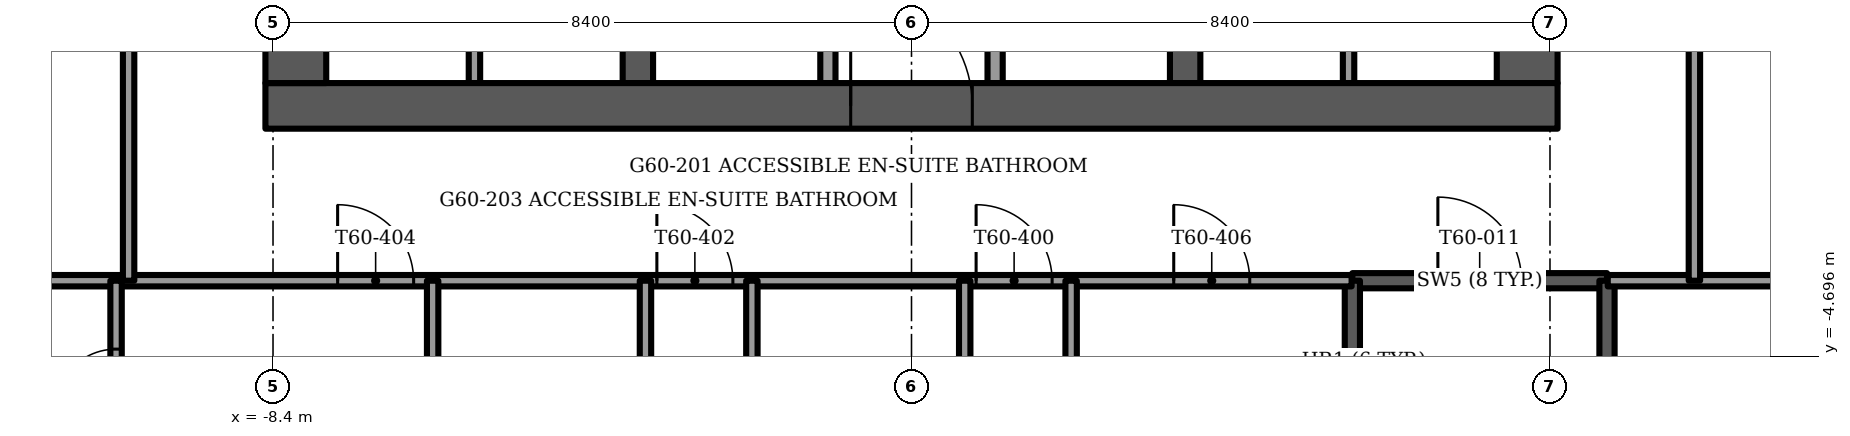
"""IFC4 building model, lengths in metres.
Left out: names, types, materials, properties, quantities, classifications, styles, units other than length and angle.
Written with IfcOpenShell. Run it as: python <this file> out.ifc"""

import sys

from ifc_helpers import new_model, si_unit, direction, frame, frame_2d, origin, place, context, subcontext, project, spatial, rectangle, extrude, element, fill, save


model = new_model("IFC4")
c1 = context("Model", 3, precision=1e-05, world=origin(), true_north=direction((0.0, 1.0)))
c2 = subcontext(c1, "Body", "Model", "MODEL_VIEW")
j1 = project(units=[si_unit("LENGTHUNIT", "METRE"), si_unit("PLANEANGLEUNIT", "RADIAN")], contexts=[c1])
p1 = place(None, origin())
s1 = spatial("IfcSite", under=j1, at=p1, CompositionType="ELEMENT")
p2 = place(p1, origin())
s2 = spatial("IfcBuilding", under=s1, at=p2, CompositionType="ELEMENT")
p3 = place(p2, frame((0.0, 0.0, 245.0)))
s3 = spatial("IfcBuildingStorey", under=s2, at=p3, CompositionType="ELEMENT", Elevation=245.0)
p4 = place(p3, frame((-8.5, -1.4, -0.3), z_axis=(0.0, 0.0, 1.0), x_axis=(1.0, 0.0, 0.0)))
e1 = element("IfcWall", 1, at=p4, inside=s3, PredefinedType="SHEAR", context=c2, shape_type="SweptSolid", body=[
    extrude(rectangle(XDim=17.0, YDim=0.6, at=frame_2d((8.5, 0.0))), origin(), (0.0, 0.0, 1.0), 3.75),
])
p5 = place(p4, frame((7.7, 0.0, 0.0)))
e2 = element("IfcOpeningElement", 2, at=p5, cuts=e1, PredefinedType="OPENING", context=c2, shape_type="SweptSolid", body=[
    extrude(rectangle(XDim=1.6, YDim=2.1, at=frame_2d((0.8, 1.05))), frame((0.0, 0.3, 0.0), z_axis=(0.0, -1.0, 0.0), x_axis=(1.0, 0.0, 0.0)), (0.0, 0.0, 1.0), 0.6),
])
p6 = place(p3, frame((-8.1, -1.1, -0.3), z_axis=(0.0, 0.0, 1.0), x_axis=(0.0, 1.0, 0.0)))
e3 = element("IfcWall", 3, at=p6, inside=s3, PredefinedType="SHEAR", context=c2, shape_type="SweptSolid", body=[
    extrude(rectangle(XDim=10.2, YDim=0.8, at=frame_2d((5.1, 0.0))), origin(), (0.0, 0.0, 1.0), 3.75),
])
p7 = place(p6, frame((8.35, 0.0, 0.0)))
e4 = element("IfcOpeningElement", 4, at=p7, cuts=e3, PredefinedType="OPENING", context=c2, shape_type="SweptSolid", body=[
    extrude(rectangle(XDim=1.1, YDim=2.1, at=frame_2d((0.55, 1.05))), frame((0.0, 0.4, 0.0), z_axis=(0.0, -1.0, 0.0), x_axis=(1.0, 0.0, 0.0)), (0.0, 0.0, 1.0), 0.8),
])
p8 = place(p3, frame((8.1, -1.1, -0.3), z_axis=(0.0, 0.0, 1.0), x_axis=(0.0, 1.0, 0.0)))
e5 = element("IfcWall", 5, at=p8, inside=s3, PredefinedType="SHEAR", context=c2, shape_type="SweptSolid", body=[
    extrude(rectangle(XDim=10.2, YDim=0.8, at=frame_2d((5.1, 0.0))), origin(), (0.0, 0.0, 1.0), 3.75),
])
p9 = place(p8, frame((8.35, 0.0, 0.0)))
e6 = element("IfcOpeningElement", 6, at=p9, cuts=e5, PredefinedType="OPENING", context=c2, shape_type="SweptSolid", body=[
    extrude(rectangle(XDim=1.1, YDim=2.1, at=frame_2d((0.55, 1.05))), frame((0.0, 0.4, 0.0), z_axis=(0.0, -1.0, 0.0), x_axis=(1.0, 0.0, 0.0)), (0.0, 0.0, 1.0), 0.8),
])
for number, where, z_axis, x_axis in (
    (7, (-3.6, -1.1, -0.3), (0.0, 0.0, 1.0), (0.0, 1.0, 0.0)),
    (8, (3.6, -1.1, -0.3), (0.0, 0.0, 1.0), (0.0, 1.0, 0.0)),
):
    element("IfcWall", number, at=place(p3, frame(where, z_axis=z_axis, x_axis=x_axis)), inside=s3, PredefinedType="SHEAR", context=c2, shape_type="SweptSolid", body=[
        extrude(rectangle(XDim=10.2, YDim=0.4, at=frame_2d((5.1, 0.0))), origin(), (0.0, 0.0, 1.0), 3.75),
    ])
p10 = place(p3, frame((-15.387, -1.198, 0.0), z_axis=(0.0, 0.0, 1.0), x_axis=(0.499997087355, -0.866027085394, 0.0)))
e9 = element("IfcWall", 9, at=p10, inside=s3, PredefinedType="SOLIDWALL", context=c2, shape_type="SweptSolid", body=[
    extrude(rectangle(XDim=13.312, YDim=0.15, at=frame_2d((6.656, 0.0))), origin(), (0.0, 0.0, 1.0), 3.45),
])
p11 = place(p10, frame((4.115, 0.0, 0.15)))
e10 = element("IfcOpeningElement", 10, at=p11, cuts=e9, PredefinedType="OPENING", context=c2, shape_type="SweptSolid", body=[
    extrude(rectangle(XDim=1.4, YDim=2.85, at=frame_2d((0.7, 1.425))), frame((0.0, 0.075, 0.0), z_axis=(0.0, -1.0, 0.0), x_axis=(1.0, 0.0, 0.0)), (0.0, 0.0, 1.0), 0.15),
])
p12 = place(p10, frame((6.956, 0.0, 0.15)))
e11 = element("IfcOpeningElement", 11, at=p12, cuts=e9, PredefinedType="OPENING", context=c2, shape_type="SweptSolid", body=[
    extrude(rectangle(XDim=1.5, YDim=2.85, at=frame_2d((0.75, 1.425))), frame((0.0, 0.075, 0.0), z_axis=(0.0, -1.0, 0.0), x_axis=(1.0, 0.0, 0.0)), (0.0, 0.0, 1.0), 0.15),
])
p13 = place(p10, frame((9.156, 0.0, 0.0)))
e12 = element("IfcOpeningElement", 12, at=p13, cuts=e9, PredefinedType="OPENING", context=c2, shape_type="SweptSolid", body=[
    extrude(rectangle(XDim=1.4, YDim=2.4, at=frame_2d((0.7, 1.2))), frame((0.0, 0.075, 0.0), z_axis=(0.0, -1.0, 0.0), x_axis=(1.0, 0.0, 0.0)), (0.0, 0.0, 1.0), 0.15),
])
p14 = place(p10, frame((0.428, 0.0, 0.15)))
e13 = element("IfcOpeningElement", 13, at=p14, cuts=e9, PredefinedType="OPENING", context=c2, shape_type="SweptSolid", body=[
    extrude(rectangle(XDim=1.5, YDim=2.73, at=frame_2d((0.75, 1.365))), frame((0.0, 0.075, 0.0), z_axis=(0.0, -1.0, 0.0), x_axis=(1.0, 0.0, 0.0)), (0.0, 0.0, 1.0), 0.15),
])
p15 = place(p3, frame((8.731, -12.727, 0.0), z_axis=(0.0, 0.0, 1.0), x_axis=(0.499997087355, 0.866027085394, 0.0)))
e14 = element("IfcWall", 14, at=p15, inside=s3, PredefinedType="SOLIDWALL", context=c2, shape_type="SweptSolid", body=[
    extrude(rectangle(XDim=13.312, YDim=0.15, at=frame_2d((6.656, 0.0))), origin(), (0.0, 0.0, 1.0), 3.45),
])
p16 = place(p15, frame((2.756, 0.0, 0.15)))
e15 = element("IfcOpeningElement", 15, at=p16, cuts=e14, PredefinedType="OPENING", context=c2, shape_type="SweptSolid", body=[
    extrude(rectangle(XDim=1.5, YDim=2.85, at=frame_2d((0.75, 1.425))), frame((0.0, 0.075, 0.0), z_axis=(0.0, -1.0, 0.0), x_axis=(1.0, 0.0, 0.0)), (0.0, 0.0, 1.0), 0.15),
])
p17 = place(p15, frame((4.956, 0.0, 0.0)))
e16 = element("IfcOpeningElement", 16, at=p17, cuts=e14, PredefinedType="OPENING", context=c2, shape_type="SweptSolid", body=[
    extrude(rectangle(XDim=1.4, YDim=2.4, at=frame_2d((0.7, 1.2))), frame((0.0, 0.075, 0.0), z_axis=(0.0, -1.0, 0.0), x_axis=(1.0, 0.0, 0.0)), (0.0, 0.0, 1.0), 0.15),
])
p18 = place(p15, frame((6.956, 0.0, 0.15)))
e17 = element("IfcOpeningElement", 17, at=p18, cuts=e14, PredefinedType="OPENING", context=c2, shape_type="SweptSolid", body=[
    extrude(rectangle(XDim=0.9, YDim=2.85, at=frame_2d((0.45, 1.425))), frame((0.0, 0.075, 0.0), z_axis=(0.0, -1.0, 0.0), x_axis=(1.0, 0.0, 0.0)), (0.0, 0.0, 1.0), 0.15),
])
p19 = place(p15, frame((8.149, 0.0, 0.0)))
e18 = element("IfcOpeningElement", 18, at=p19, cuts=e14, PredefinedType="OPENING", context=c2, shape_type="SweptSolid", body=[
    extrude(rectangle(XDim=1.4, YDim=2.4, at=frame_2d((0.7, 1.2))), frame((0.0, 0.075, 0.0), z_axis=(0.0, -1.0, 0.0), x_axis=(1.0, 0.0, 0.0)), (0.0, 0.0, 1.0), 0.15),
])
p20 = place(p15, frame((11.385, 0.0, 0.15)))
e19 = element("IfcOpeningElement", 19, at=p20, cuts=e14, PredefinedType="OPENING", context=c2, shape_type="SweptSolid", body=[
    extrude(rectangle(XDim=1.5, YDim=2.73, at=frame_2d((0.75, 1.365))), frame((0.0, 0.075, 0.0), z_axis=(0.0, -1.0, 0.0), x_axis=(1.0, 0.0, 0.0)), (0.0, 0.0, 1.0), 0.15),
])
for number, where, z_axis, x_axis in (
    (20, (-1.1, -1.1, 0.0), (0.0, 0.0, 1.0), (0.0, 1.0, 0.0)),
    (21, (1.1, -1.1, 0.0), (0.0, 0.0, 1.0), (0.0, 1.0, 0.0)),
):
    element("IfcWall", number, at=place(p3, frame(where, z_axis=z_axis, x_axis=x_axis)), inside=s3, PredefinedType="PARTITIONING", context=c2, shape_type="SweptSolid", body=[
        extrude(rectangle(XDim=2.9, YDim=0.2, at=frame_2d((1.45, 0.0))), origin(), (0.0, 0.0, 1.0), 3.45),
    ])
for number, where, z_axis, x_axis in (
    (22, (-5.75, -1.1, 0.0), (0.0, 0.0, 1.0), (0.0, 1.0, 0.0)),
    (23, (5.75, -1.1, 0.0), (0.0, 0.0, 1.0), (0.0, 1.0, 0.0)),
):
    element("IfcWall", number, at=place(p3, frame(where, z_axis=z_axis, x_axis=x_axis)), inside=s3, PredefinedType="PARTITIONING", context=c2, shape_type="SweptSolid", body=[
        extrude(rectangle(XDim=2.0, YDim=0.15, at=frame_2d((1.0, 0.0))), origin(), (0.0, 0.0, 1.0), 3.45),
    ])
p21 = place(p3, frame((5.8, -3.7, -0.3), z_axis=(0.0, 0.0, 1.0), x_axis=(1.0, 0.0, 0.0)))
e24 = element("IfcWall", 24, at=p21, inside=s3, PredefinedType="SOLIDWALL", context=c2, shape_type="SweptSolid", body=[
    extrude(rectangle(XDim=3.35, YDim=0.2, at=frame_2d((1.675, 0.0))), origin(), (0.0, 0.0, 1.0), 3.75),
])
p22 = place(p21, frame((1.125, 0.0, 0.0)))
e25 = element("IfcOpeningElement", 25, at=p22, cuts=e24, PredefinedType="OPENING", context=c2, shape_type="SweptSolid", body=[
    extrude(rectangle(XDim=1.1, YDim=2.1, at=frame_2d((0.55, 1.05))), frame((0.0, 0.1, 0.0), z_axis=(0.0, -1.0, 0.0), x_axis=(1.0, 0.0, 0.0)), (0.0, 0.0, 1.0), 0.2),
])
for number, where, z_axis, x_axis in (
    (26, (5.8, -3.7, -0.3), (0.0, 0.0, 1.0), (0.0, -1.0, 0.0)),
    (27, (9.15, -3.7, -0.3), (0.0, 0.0, 1.0), (0.0, -1.0, 0.0)),
):
    element("IfcWall", number, at=place(p3, frame(where, z_axis=z_axis, x_axis=x_axis)), inside=s3, PredefinedType="SOLIDWALL", context=c2, shape_type="SweptSolid", body=[
        extrude(rectangle(XDim=7.7, YDim=0.2, at=frame_2d((3.85, 0.0))), origin(), (0.0, 0.0, 1.0), 3.75),
    ])
p23 = place(p3, frame((-13.995, -3.7, 0.0), z_axis=(0.0, 0.0, 1.0), x_axis=(1.0, 0.0, 0.0)))
e28 = element("IfcWall", 28, at=p23, inside=s3, PredefinedType="PARTITIONING", context=c2, shape_type="SweptSolid", body=[
    extrude(rectangle(XDim=19.785, YDim=0.15, at=frame_2d((9.893, 0.0))), origin(), (0.0, 0.0, 1.0), 3.45),
])
p24 = place(p23, frame((14.845, 0.0, 0.0)))
e29 = element("IfcOpeningElement", 29, at=p24, cuts=e28, PredefinedType="OPENING", context=c2, shape_type="SweptSolid", body=[
    extrude(rectangle(XDim=1.0, YDim=2.1, at=frame_2d((0.5, 1.05))), frame((0.0, 0.075, 0.0), z_axis=(0.0, -1.0, 0.0), x_axis=(1.0, 0.0, 0.0)), (0.0, 0.0, 1.0), 0.15),
])
p25 = place(p23, frame((10.645, 0.0, 0.0)))
e30 = element("IfcOpeningElement", 30, at=p25, cuts=e28, PredefinedType="OPENING", context=c2, shape_type="SweptSolid", body=[
    extrude(rectangle(XDim=1.0, YDim=2.1, at=frame_2d((0.5, 1.05))), frame((0.0, 0.075, 0.0), z_axis=(0.0, -1.0, 0.0), x_axis=(1.0, 0.0, 0.0)), (0.0, 0.0, 1.0), 0.15),
])
p26 = place(p23, frame((6.445, 0.0, 0.0)))
e31 = element("IfcOpeningElement", 31, at=p26, cuts=e28, PredefinedType="OPENING", context=c2, shape_type="SweptSolid", body=[
    extrude(rectangle(XDim=1.0, YDim=2.1, at=frame_2d((0.5, 1.05))), frame((0.0, 0.075, 0.0), z_axis=(0.0, -1.0, 0.0), x_axis=(1.0, 0.0, 0.0)), (0.0, 0.0, 1.0), 0.15),
])
p27 = place(p23, frame((17.445, 0.0, 0.0)))
e32 = element("IfcOpeningElement", 32, at=p27, cuts=e28, PredefinedType="OPENING", context=c2, shape_type="SweptSolid", body=[
    extrude(rectangle(XDim=1.0, YDim=2.1, at=frame_2d((0.5, 1.05))), frame((0.0, 0.075, 0.0), z_axis=(0.0, -1.0, 0.0), x_axis=(1.0, 0.0, 0.0)), (0.0, 0.0, 1.0), 0.15),
])
p28 = place(p3, frame((9.16, -3.7, 0.0), z_axis=(0.0, 0.0, 1.0), x_axis=(1.0, 0.0, 0.0)))
e33 = element("IfcWall", 33, at=p28, inside=s3, PredefinedType="PARTITIONING", context=c2, shape_type="SweptSolid", body=[
    extrude(rectangle(XDim=4.835, YDim=0.15, at=frame_2d((2.417, 0.0))), origin(), (0.0, 0.0, 1.0), 3.45),
])
p29 = place(p3, frame((10.3, -3.7, 0.0), z_axis=(0.0, 0.0, 1.0), x_axis=(0.0, 1.0, 0.0)))
e34 = element("IfcWall", 34, at=p29, inside=s3, PredefinedType="PARTITIONING", context=c2, shape_type="SweptSolid", body=[
    extrude(rectangle(XDim=12.469, YDim=0.15, at=frame_2d((6.234, 0.0))), origin(), (0.0, 0.0, 1.0), 3.45),
])
p30 = place(p29, frame((4.471, 0.0, 0.0)))
e35 = element("IfcOpeningElement", 35, at=p30, cuts=e34, PredefinedType="OPENING", context=c2, shape_type="SweptSolid", body=[
    extrude(rectangle(XDim=1.0, YDim=2.1, at=frame_2d((0.5, 1.05))), frame((0.0, 0.075, 0.0), z_axis=(0.0, -1.0, 0.0), x_axis=(1.0, 0.0, 0.0)), (0.0, 0.0, 1.0), 0.15),
])
p31 = place(p29, frame((9.815, 0.0, 0.0)))
e36 = element("IfcOpeningElement", 36, at=p31, cuts=e34, PredefinedType="OPENING", context=c2, shape_type="SweptSolid", body=[
    extrude(rectangle(XDim=1.0, YDim=2.1, at=frame_2d((0.5, 1.05))), frame((0.0, 0.075, 0.0), z_axis=(0.0, -1.0, 0.0), x_axis=(1.0, 0.0, 0.0)), (0.0, 0.0, 1.0), 0.15),
])
p32 = place(p3, frame((2.1, -13.304, 0.0), z_axis=(0.0, 0.0, 1.0), x_axis=(0.0, 1.0, 0.0)))
e37 = element("IfcWall", 37, at=p32, inside=s3, PredefinedType="PARTITIONING", context=c2, shape_type="SweptSolid", body=[
    extrude(rectangle(XDim=9.604, YDim=0.15, at=frame_2d((4.802, 0.0))), origin(), (0.0, 0.0, 1.0), 3.45),
])
p33 = place(p3, frame((0.7, -7.5, 0.0), z_axis=(0.0, 0.0, 1.0), x_axis=(0.0, 1.0, 0.0)))
e38 = element("IfcWall", 38, at=p33, inside=s3, PredefinedType="PARTITIONING", context=c2, shape_type="SweptSolid", body=[
    extrude(rectangle(XDim=3.8, YDim=0.15, at=frame_2d((1.9, 0.0))), origin(), (0.0, 0.0, 1.0), 3.45),
])
p34 = place(p33, frame((1.45, 0.0, 0.0)))
e39 = element("IfcOpeningElement", 39, at=p34, cuts=e38, PredefinedType="OPENING", context=c2, shape_type="SweptSolid", body=[
    extrude(rectangle(XDim=0.9, YDim=2.1, at=frame_2d((0.45, 1.05))), frame((0.0, 0.075, 0.0), z_axis=(0.0, -1.0, 0.0), x_axis=(1.0, 0.0, 0.0)), (0.0, 0.0, 1.0), 0.15),
])
p35 = place(p3, frame((-2.1, -13.304, 0.0), z_axis=(0.0, 0.0, 1.0), x_axis=(0.0, 1.0, 0.0)))
e40 = element("IfcWall", 40, at=p35, inside=s3, PredefinedType="PARTITIONING", context=c2, shape_type="SweptSolid", body=[
    extrude(rectangle(XDim=9.604, YDim=0.15, at=frame_2d((4.802, 0.0))), origin(), (0.0, 0.0, 1.0), 3.45),
])
p36 = place(p3, frame((-3.5, -7.5, 0.0), z_axis=(0.0, 0.0, 1.0), x_axis=(0.0, 1.0, 0.0)))
e41 = element("IfcWall", 41, at=p36, inside=s3, PredefinedType="PARTITIONING", context=c2, shape_type="SweptSolid", body=[
    extrude(rectangle(XDim=3.8, YDim=0.15, at=frame_2d((1.9, 0.0))), origin(), (0.0, 0.0, 1.0), 3.45),
])
p37 = place(p36, frame((1.45, 0.0, 0.0)))
e42 = element("IfcOpeningElement", 42, at=p37, cuts=e41, PredefinedType="OPENING", context=c2, shape_type="SweptSolid", body=[
    extrude(rectangle(XDim=0.9, YDim=2.1, at=frame_2d((0.45, 1.05))), frame((0.0, 0.075, 0.0), z_axis=(0.0, -1.0, 0.0), x_axis=(1.0, 0.0, 0.0)), (0.0, 0.0, 1.0), 0.15),
])
p38 = place(p3, frame((-6.3, -13.304, 0.0), z_axis=(0.0, 0.0, 1.0), x_axis=(0.0, 1.0, 0.0)))
e43 = element("IfcWall", 43, at=p38, inside=s3, PredefinedType="PARTITIONING", context=c2, shape_type="SweptSolid", body=[
    extrude(rectangle(XDim=9.604, YDim=0.15, at=frame_2d((4.802, 0.0))), origin(), (0.0, 0.0, 1.0), 3.45),
])
p39 = place(p3, frame((-10.3, -3.7, 0.0), z_axis=(0.0, 0.0, 1.0), x_axis=(0.0, 1.0, 0.0)))
e44 = element("IfcWall", 44, at=p39, inside=s3, PredefinedType="PARTITIONING", context=c2, shape_type="SweptSolid", body=[
    extrude(rectangle(XDim=12.469, YDim=0.15, at=frame_2d((6.234, 0.0))), origin(), (0.0, 0.0, 1.0), 3.45),
])
p40 = place(p39, frame((4.332, 0.0, 0.0)))
e45 = element("IfcOpeningElement", 45, at=p40, cuts=e44, PredefinedType="OPENING", context=c2, shape_type="SweptSolid", body=[
    extrude(rectangle(XDim=1.0, YDim=2.1, at=frame_2d((0.5, 1.05))), frame((0.0, 0.075, 0.0), z_axis=(0.0, -1.0, 0.0), x_axis=(1.0, 0.0, 0.0)), (0.0, 0.0, 1.0), 0.15),
])
p41 = place(p39, frame((9.815, 0.0, 0.0)))
e46 = element("IfcOpeningElement", 46, at=p41, cuts=e44, PredefinedType="OPENING", context=c2, shape_type="SweptSolid", body=[
    extrude(rectangle(XDim=1.0, YDim=2.1, at=frame_2d((0.5, 1.05))), frame((0.0, 0.075, 0.0), z_axis=(0.0, -1.0, 0.0), x_axis=(1.0, 0.0, 0.0)), (0.0, 0.0, 1.0), 0.15),
])
p42 = place(p3, frame((-10.465, -6.3, 0.0), z_axis=(0.0, 0.0, 1.0), x_axis=(0.0, 1.0, 0.0)))
e47 = element("IfcWall", 47, at=p42, inside=s3, PredefinedType="PARTITIONING", context=c2, shape_type="SweptSolid", body=[
    extrude(rectangle(XDim=2.6, YDim=0.15, at=frame_2d((1.3, 0.0))), origin(), (0.0, 0.0, 1.0), 3.45),
])
p43 = place(p42, frame((0.9, 0.0, 0.0)))
e48 = element("IfcOpeningElement", 48, at=p43, cuts=e47, PredefinedType="OPENING", context=c2, shape_type="SweptSolid", body=[
    extrude(rectangle(XDim=0.8, YDim=2.1, at=frame_2d((0.4, 1.05))), frame((0.0, 0.075, 0.0), z_axis=(0.0, -1.0, 0.0), x_axis=(1.0, 0.0, 0.0)), (0.0, 0.0, 1.0), 0.15),
])
p44 = place(p5, origin())
e49 = element("IfcDoor", 49, at=p44, inside=s3, OperationType="DOUBLE_DOOR_SINGLE_SWING", PredefinedType="DOOR", context=c2, shape_type="SweptSolid", body=[
    extrude(rectangle(XDim=1.6, YDim=2.1, at=frame_2d((0.8, 1.05))), frame((0.0, 0.025, 0.0), z_axis=(0.0, -1.0, 0.0), x_axis=(1.0, 0.0, 0.0)), (0.0, 0.0, 1.0), 0.05),
])
fill(e2, e49)
p45 = place(p22, origin())
e50 = element("IfcDoor", 50, at=p45, inside=s3, OperationType="SINGLE_SWING_LEFT", PredefinedType="DOOR", context=c2, shape_type="SweptSolid", body=[
    extrude(rectangle(XDim=1.1, YDim=2.1, at=frame_2d((0.55, 1.05))), frame((0.0, 0.025, 0.0), z_axis=(0.0, -1.0, 0.0), x_axis=(1.0, 0.0, 0.0)), (0.0, 0.0, 1.0), 0.05),
])
fill(e25, e50)
p46 = place(p24, origin())
e51 = element("IfcDoor", 51, at=p46, inside=s3, OperationType="SINGLE_SWING_RIGHT", PredefinedType="DOOR", context=c2, shape_type="SweptSolid", body=[
    extrude(rectangle(XDim=1.0, YDim=2.1, at=frame_2d((0.5, 1.05))), frame((0.0, 0.025, 0.0), z_axis=(0.0, -1.0, 0.0), x_axis=(1.0, 0.0, 0.0)), (0.0, 0.0, 1.0), 0.05),
])
fill(e29, e51)
p47 = place(p25, origin())
e52 = element("IfcDoor", 52, at=p47, inside=s3, OperationType="SINGLE_SWING_RIGHT", PredefinedType="DOOR", context=c2, shape_type="SweptSolid", body=[
    extrude(rectangle(XDim=1.0, YDim=2.1, at=frame_2d((0.5, 1.05))), frame((0.0, 0.025, 0.0), z_axis=(0.0, -1.0, 0.0), x_axis=(1.0, 0.0, 0.0)), (0.0, 0.0, 1.0), 0.05),
])
fill(e30, e52)
p48 = place(p26, origin())
e53 = element("IfcDoor", 53, at=p48, inside=s3, OperationType="SINGLE_SWING_RIGHT", PredefinedType="DOOR", context=c2, shape_type="SweptSolid", body=[
    extrude(rectangle(XDim=1.0, YDim=2.1, at=frame_2d((0.5, 1.05))), frame((0.0, 0.025, 0.0), z_axis=(0.0, -1.0, 0.0), x_axis=(1.0, 0.0, 0.0)), (0.0, 0.0, 1.0), 0.05),
])
fill(e31, e53)
p49 = place(p43, origin())
e54 = element("IfcDoor", 54, at=p49, inside=s3, OperationType="SINGLE_SWING_RIGHT", PredefinedType="DOOR", context=c2, shape_type="SweptSolid", body=[
    extrude(rectangle(XDim=0.8, YDim=2.1, at=frame_2d((0.4, 1.05))), frame((0.0, 0.025, 0.0), z_axis=(0.0, -1.0, 0.0), x_axis=(1.0, 0.0, 0.0)), (0.0, 0.0, 1.0), 0.05),
])
fill(e48, e54)
p50 = place(p27, origin())
e55 = element("IfcDoor", 55, at=p50, inside=s3, OperationType="SINGLE_SWING_LEFT", PredefinedType="DOOR", context=c2, shape_type="SweptSolid", body=[
    extrude(rectangle(XDim=1.0, YDim=2.1, at=frame_2d((0.5, 1.05))), frame((0.0, 0.025, 0.0), z_axis=(0.0, -1.0, 0.0), x_axis=(1.0, 0.0, 0.0)), (0.0, 0.0, 1.0), 0.05),
])
fill(e32, e55)
save(model, sys.argv[1])
